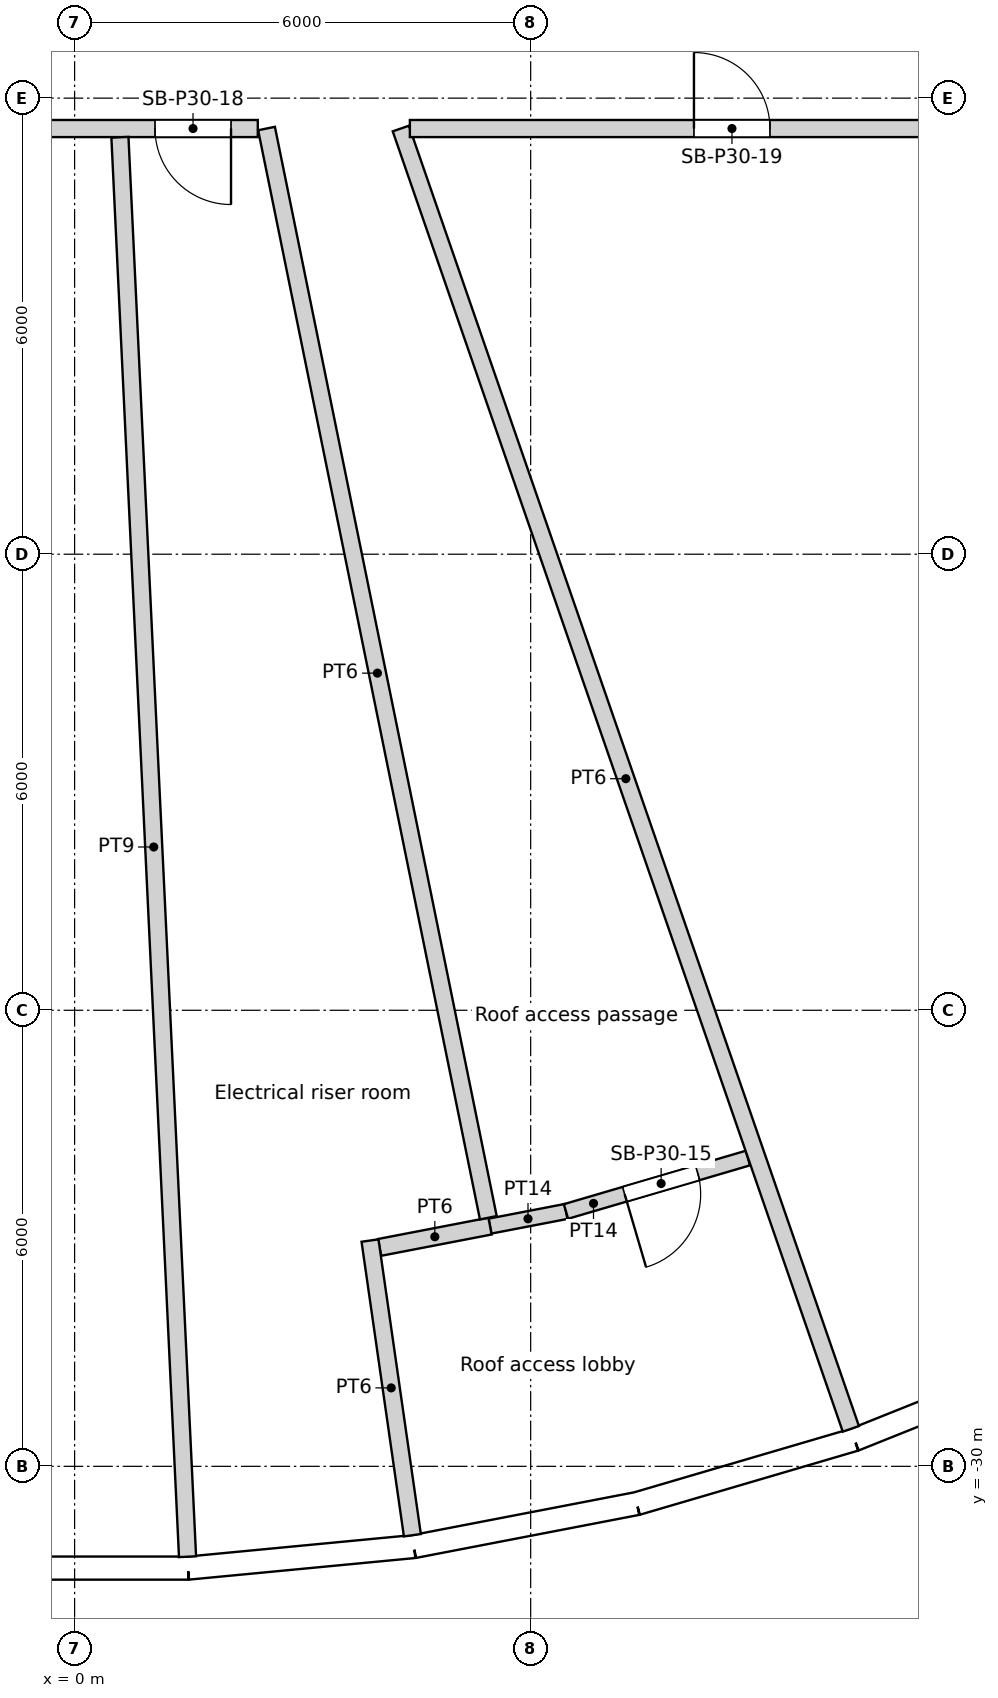
"""IFC4 building model, lengths in metres.
Left out: names, types, materials, properties, quantities, classifications, styles, units other than length and angle.
Written with IfcOpenShell. Run it as: python <this file> out.ifc"""

import sys

from ifc_helpers import new_model, si_unit, direction, frame, frame_2d, origin, origin_2d, place, context, subcontext, project, spatial, rectangle, circle, extrude, element, fill, save


model = new_model("IFC4")
c1 = context("Model", 3, precision=1e-05, world=origin(), true_north=direction((0.0, 1.0)))
c2 = subcontext(c1, "Body", "Model", "MODEL_VIEW")
j1 = project(units=[si_unit("LENGTHUNIT", "METRE"), si_unit("PLANEANGLEUNIT", "RADIAN")], contexts=[c1])
p1 = place(None, origin())
s1 = spatial("IfcSite", under=j1, at=p1, CompositionType="ELEMENT")
p2 = place(p1, origin())
s2 = spatial("IfcBuilding", under=s1, at=p2, CompositionType="ELEMENT")
p3 = place(p2, frame((0.0, 0.0, 120.0)))
s3 = spatial("IfcBuildingStorey", under=s2, at=p3, CompositionType="ELEMENT", Elevation=120.0)
for number, where, z_axis, x_axis in (
    (1, (1.44, -30.24, 0.0), (0.0, 0.0, 1.0), (1.0, 0.0, 0.0)),
    (2, (7.137, -29.421, 0.0), (0.0, 0.0, 1.0), (1.0, 0.0, 0.0)),
):
    element("IfcColumn", number, at=place(p3, frame(where, z_axis=z_axis, x_axis=x_axis)), inside=s3, PredefinedType="COLUMN", context=c2, shape_type="SweptSolid", body=[
        extrude(circle(Radius=0.6, at=origin_2d()), origin(), (0.0, 0.0, 1.0), 6.0),
    ])
for number, where, z_axis, x_axis in (
    (3, (4.263, -24.175, 0.0), (0.0, 0.0, 1.0), (1.0, 0.0, 0.0)),
    (4, (9.723, -22.54, 0.0), (0.0, 0.0, 1.0), (1.0, 0.0, 0.0)),
):
    element("IfcColumn", number, at=place(p3, frame(where, z_axis=z_axis, x_axis=x_axis)), inside=s3, PredefinedType="COLUMN", context=c2, shape_type="SweptSolid", body=[
        extrude(circle(Radius=0.65, at=origin_2d()), origin(), (0.0, 0.0, 1.0), 6.0),
    ])
for number, where, z_axis, x_axis in (
    (5, (1.406, -18.77, 0.0), (0.0, 0.0, 1.0), (1.0, 0.0, 0.0)),
    (6, (6.876, -17.521, 0.0), (0.0, 0.0, 1.0), (1.0, 0.0, 0.0)),
    (7, (11.735, -14.716, 0.0), (0.0, 0.0, 1.0), (1.0, 0.0, 0.0)),
):
    element("IfcColumn", number, at=place(p3, frame(where, z_axis=z_axis, x_axis=x_axis)), inside=s3, PredefinedType="COLUMN", context=c2, shape_type="SweptSolid", body=[
        extrude(circle(Radius=0.7, at=origin_2d()), origin(), (0.0, 0.0, 1.0), 6.0),
    ])
p4 = place(p3, frame((-1.493, -31.339, 0.0), z_axis=(0.0, 0.0, 1.0), x_axis=(1.0, 0.0, 0.0)))
e8 = element("IfcWall", 8, at=p4, inside=s3, PredefinedType="SOLIDWALL", context=c2, shape_type="SweptSolid", body=[
    extrude(rectangle(XDim=2.986, YDim=0.3, at=frame_2d((1.493, 0.0))), origin(), (0.0, 0.0, 1.0), 5.7),
])
p5 = place(p4, frame((1.493, 0.0, 1.8)))
e9 = element("IfcOpeningElement", 9, at=p5, cuts=e8, PredefinedType="OPENING", context=c2, shape_type="SweptSolid", body=[
    extrude(circle(Radius=1.2, at=origin_2d()), frame((0.0, 0.16, 0.0), z_axis=(0.0, -1.0, 0.0), x_axis=(1.0, 0.0, 0.0)), (0.0, 0.0, 1.0), 0.32),
])
p6 = place(p3, frame((1.493, -31.339, 0.0), z_axis=(0.0, 0.0, 1.0), x_axis=(0.99547560533, 0.095017467833, 0.0)))
e10 = element("IfcWall", 10, at=p6, inside=s3, PredefinedType="SOLIDWALL", context=c2, shape_type="SweptSolid", body=[
    extrude(rectangle(XDim=2.986, YDim=0.3, at=frame_2d((1.493, 0.0))), origin(), (0.0, 0.0, 1.0), 5.7),
])
p7 = place(p6, frame((1.493, 0.0, 1.8)))
e11 = element("IfcOpeningElement", 11, at=p7, cuts=e10, PredefinedType="OPENING", context=c2, shape_type="SweptSolid", body=[
    extrude(circle(Radius=1.2, at=origin_2d()), frame((0.0, 0.16, 0.0), z_axis=(0.0, -1.0, 0.0), x_axis=(1.0, 0.0, 0.0)), (0.0, 0.0, 1.0), 0.32),
])
p8 = place(p3, frame((4.465, -31.055, 0.0), z_axis=(0.0, 0.0, 1.0), x_axis=(0.981918853666, 0.189302310646, 0.0)))
e12 = element("IfcWall", 12, at=p8, inside=s3, PredefinedType="SOLIDWALL", context=c2, shape_type="SweptSolid", body=[
    extrude(rectangle(XDim=2.986, YDim=0.3, at=frame_2d((1.493, 0.0))), origin(), (0.0, 0.0, 1.0), 5.7),
])
p9 = place(p8, frame((1.493, 0.0, 1.8)))
e13 = element("IfcOpeningElement", 13, at=p9, cuts=e12, PredefinedType="OPENING", context=c2, shape_type="SweptSolid", body=[
    extrude(circle(Radius=1.2, at=origin_2d()), frame((0.0, 0.16, 0.0), z_axis=(0.0, -1.0, 0.0), x_axis=(1.0, 0.0, 0.0)), (0.0, 0.0, 1.0), 0.32),
])
p10 = place(p3, frame((7.397, -30.49, 0.0), z_axis=(0.0, 0.0, 1.0), x_axis=(0.959502108153, 0.281701445593, 0.0)))
e14 = element("IfcWall", 14, at=p10, inside=s3, PredefinedType="SOLIDWALL", context=c2, shape_type="SweptSolid", body=[
    extrude(rectangle(XDim=2.986, YDim=0.3, at=frame_2d((1.493, 0.0))), origin(), (0.0, 0.0, 1.0), 5.7),
])
p11 = place(p10, frame((1.493, 0.0, 1.8)))
e15 = element("IfcOpeningElement", 15, at=p11, cuts=e14, PredefinedType="OPENING", context=c2, shape_type="SweptSolid", body=[
    extrude(circle(Radius=1.2, at=origin_2d()), frame((0.0, 0.16, 0.0), z_axis=(0.0, -1.0, 0.0), x_axis=(1.0, 0.0, 0.0)), (0.0, 0.0, 1.0), 0.32),
])
p12 = place(p3, frame((10.261, -29.649, 0.0), z_axis=(0.0, 0.0, 1.0), x_axis=(0.928380795373, 0.371630325434, 0.0)))
e16 = element("IfcWall", 16, at=p12, inside=s3, PredefinedType="SOLIDWALL", context=c2, shape_type="SweptSolid", body=[
    extrude(rectangle(XDim=2.986, YDim=0.3, at=frame_2d((1.493, 0.0))), origin(), (0.0, 0.0, 1.0), 5.7),
])
p13 = place(p12, frame((1.493, 0.0, 1.8)))
e17 = element("IfcOpeningElement", 17, at=p13, cuts=e16, PredefinedType="OPENING", context=c2, shape_type="SweptSolid", body=[
    extrude(circle(Radius=1.2, at=origin_2d()), frame((0.0, 0.16, 0.0), z_axis=(0.0, -1.0, 0.0), x_axis=(1.0, 0.0, 0.0)), (0.0, 0.0, 1.0), 0.32),
])
p14 = place(p3, frame((-11.71, -12.4, 0.0), z_axis=(0.0, 0.0, 1.0), x_axis=(1.0, 0.0, 0.0)))
e18 = element("IfcWall", 18, at=p14, inside=s3, PredefinedType="PARTITIONING", context=c2, shape_type="SweptSolid", body=[
    extrude(rectangle(XDim=14.12, YDim=0.225, at=frame_2d((7.06, 0.0))), origin(), (0.0, 0.0, 1.0), 5.2),
])
p15 = place(p14, frame((3.265, 0.0, 0.0)))
e19 = element("IfcOpeningElement", 19, at=p15, cuts=e18, PredefinedType="OPENING", context=c2, shape_type="SweptSolid", body=[
    extrude(rectangle(XDim=1.0, YDim=2.1, at=frame_2d((0.5, 1.05))), frame((0.0, 0.113, 0.0), z_axis=(0.0, -1.0, 0.0), x_axis=(1.0, 0.0, 0.0)), (0.0, 0.0, 1.0), 0.225),
])
p16 = place(p14, frame((9.36, 0.0, 0.0)))
e20 = element("IfcOpeningElement", 20, at=p16, cuts=e18, PredefinedType="OPENING", context=c2, shape_type="SweptSolid", body=[
    extrude(rectangle(XDim=1.0, YDim=2.1, at=frame_2d((0.5, 1.05))), frame((0.0, 0.113, 0.0), z_axis=(0.0, -1.0, 0.0), x_axis=(1.0, 0.0, 0.0)), (0.0, 0.0, 1.0), 0.225),
])
p17 = place(p14, frame((12.768, 0.0, 0.0)))
e21 = element("IfcOpeningElement", 21, at=p17, cuts=e18, PredefinedType="OPENING", context=c2, shape_type="SweptSolid", body=[
    extrude(rectangle(XDim=1.0, YDim=2.1, at=frame_2d((0.5, 1.05))), frame((0.0, 0.113, 0.0), z_axis=(0.0, -1.0, 0.0), x_axis=(1.0, 0.0, 0.0)), (0.0, 0.0, 1.0), 0.225),
])
p18 = place(p3, frame((1.486, -31.189, 0.0), z_axis=(0.0, 0.0, 1.0), x_axis=(-0.047574456268, 0.998867694498, 0.0)))
e22 = element("IfcWall", 22, at=p18, inside=s3, PredefinedType="PARTITIONING", context=c2, shape_type="SweptSolid", body=[
    extrude(rectangle(XDim=18.695, YDim=0.225, at=frame_2d((9.348, 0.0))), origin(), (0.0, 0.0, 1.0), 2.7),
])
p19 = place(p3, frame((4.013, -27.12, 0.0), z_axis=(0.0, 0.0, 1.0), x_axis=(0.981915682772, 0.189318757462, 0.0)))
e23 = element("IfcWall", 23, at=p19, inside=s3, PredefinedType="PARTITIONING", context=c2, shape_type="SweptSolid", body=[
    extrude(rectangle(XDim=1.479, YDim=0.225, at=frame_2d((0.74, 0.0))), origin(), (0.0, 0.0, 1.0), 5.2),
])
p20 = place(p3, frame((4.411, -12.4, 0.0), z_axis=(0.0, 0.0, 1.0), x_axis=(1.0, 0.0, 0.0)))
e24 = element("IfcWall", 24, at=p20, inside=s3, PredefinedType="PARTITIONING", context=c2, shape_type="SweptSolid", body=[
    extrude(rectangle(XDim=13.229, YDim=0.225, at=frame_2d((6.614, 0.0))), origin(), (0.0, 0.0, 1.0), 5.2),
])
p21 = place(p20, frame((3.738, 0.0, 0.0)))
e25 = element("IfcOpeningElement", 25, at=p21, cuts=e24, PredefinedType="OPENING", context=c2, shape_type="SweptSolid", body=[
    extrude(rectangle(XDim=1.0, YDim=2.1, at=frame_2d((0.5, 1.05))), frame((0.0, 0.113, 0.0), z_axis=(0.0, -1.0, 0.0), x_axis=(1.0, 0.0, 0.0)), (0.0, 0.0, 1.0), 0.225),
])
p22 = place(p3, frame((4.444, -30.906, 0.0), z_axis=(0.0, 0.0, 1.0), x_axis=(-0.142302666682, 0.989823191815, 0.0)))
e26 = element("IfcWall", 26, at=p22, inside=s3, PredefinedType="PARTITIONING", context=c2, shape_type="SweptSolid", body=[
    extrude(rectangle(XDim=3.917, YDim=0.225, at=frame_2d((1.958, 0.0))), origin(), (0.0, 0.0, 1.0), 5.2),
])
p23 = place(p3, frame((5.443, -26.729, 0.0), z_axis=(0.0, 0.0, 1.0), x_axis=(-0.199537394252, 0.979890212368, 0.0)))
e27 = element("IfcWall", 27, at=p23, inside=s3, PredefinedType="PARTITIONING", context=c2, shape_type="SweptSolid", body=[
    extrude(rectangle(XDim=14.624, YDim=0.225, at=frame_2d((7.312, 0.0))), origin(), (0.0, 0.0, 1.0), 5.2),
])
p24 = place(p3, frame((5.465, -26.84, 0.0), z_axis=(0.0, 0.0, 1.0), x_axis=(0.981931096213, 0.189238796999, 0.0)))
e28 = element("IfcWall", 28, at=p24, inside=s3, PredefinedType="PARTITIONING", context=c2, shape_type="SweptSolid", body=[
    extrude(rectangle(XDim=1.018, YDim=0.2, at=frame_2d((0.509, 0.0))), origin(), (0.0, 0.0, 1.0), 5.2),
])
p25 = place(p3, frame((8.858, -25.944, 0.0), z_axis=(0.0, 0.0, 1.0), x_axis=(-0.959504098974, -0.281694664577, 0.0)))
e29 = element("IfcWall", 29, at=p25, inside=s3, PredefinedType="PARTITIONING", context=c2, shape_type="SweptSolid", body=[
    extrude(rectangle(XDim=2.494, YDim=0.2, at=frame_2d((1.247, 0.0))), origin(), (0.0, 0.0, 1.0), 5.2),
])
p26 = place(p25, frame((0.69, 0.0, 0.0)))
e30 = element("IfcOpeningElement", 30, at=p26, cuts=e29, PredefinedType="OPENING", context=c2, shape_type="SweptSolid", body=[
    extrude(rectangle(XDim=1.0, YDim=2.1, at=frame_2d((0.5, 1.05))), frame((0.0, 0.1, 0.0), z_axis=(0.0, -1.0, 0.0), x_axis=(1.0, 0.0, 0.0)), (0.0, 0.0, 1.0), 0.2),
])
p27 = place(p3, frame((10.212, -29.507, 0.0), z_axis=(0.0, 0.0, 1.0), x_axis=(-0.327058221259, 0.945004190418, 0.0)))
e31 = element("IfcWall", 31, at=p27, inside=s3, PredefinedType="PARTITIONING", context=c2, shape_type="SweptSolid", body=[
    extrude(rectangle(XDim=18.103, YDim=0.225, at=frame_2d((9.051, 0.0))), origin(), (0.0, 0.0, 1.0), 5.2),
])
p28 = place(p5, origin())
e32 = element("IfcWindow", 32, at=p28, inside=s3, PartitioningType="SINGLE_PANEL", PredefinedType="WINDOW", context=c2, shape_type="SweptSolid", body=[
    extrude(circle(Radius=1.2, at=origin_2d()), frame((0.0, 0.12, 0.0), z_axis=(0.0, -1.0, 0.0), x_axis=(1.0, 0.0, 0.0)), (0.0, 0.0, 1.0), 0.1),
])
fill(e9, e32)
p29 = place(p7, origin())
e33 = element("IfcWindow", 33, at=p29, inside=s3, PartitioningType="SINGLE_PANEL", PredefinedType="WINDOW", context=c2, shape_type="SweptSolid", body=[
    extrude(circle(Radius=1.2, at=origin_2d()), frame((0.0, 0.12, 0.0), z_axis=(0.0, -1.0, 0.0), x_axis=(1.0, 0.0, 0.0)), (0.0, 0.0, 1.0), 0.1),
])
fill(e11, e33)
p30 = place(p9, origin())
e34 = element("IfcWindow", 34, at=p30, inside=s3, PartitioningType="SINGLE_PANEL", PredefinedType="WINDOW", context=c2, shape_type="SweptSolid", body=[
    extrude(circle(Radius=1.2, at=origin_2d()), frame((0.0, 0.12, 0.0), z_axis=(0.0, -1.0, 0.0), x_axis=(1.0, 0.0, 0.0)), (0.0, 0.0, 1.0), 0.1),
])
fill(e13, e34)
p31 = place(p11, origin())
e35 = element("IfcWindow", 35, at=p31, inside=s3, PartitioningType="SINGLE_PANEL", PredefinedType="WINDOW", context=c2, shape_type="SweptSolid", body=[
    extrude(circle(Radius=1.2, at=origin_2d()), frame((0.0, 0.12, 0.0), z_axis=(0.0, -1.0, 0.0), x_axis=(1.0, 0.0, 0.0)), (0.0, 0.0, 1.0), 0.1),
])
fill(e15, e35)
p32 = place(p13, origin())
e36 = element("IfcWindow", 36, at=p32, inside=s3, PartitioningType="SINGLE_PANEL", PredefinedType="WINDOW", context=c2, shape_type="SweptSolid", body=[
    extrude(circle(Radius=1.2, at=origin_2d()), frame((0.0, 0.12, 0.0), z_axis=(0.0, -1.0, 0.0), x_axis=(1.0, 0.0, 0.0)), (0.0, 0.0, 1.0), 0.1),
])
fill(e17, e36)
p33 = place(p26, origin())
e37 = element("IfcDoor", 37, at=p33, inside=s3, OperationType="SINGLE_SWING_RIGHT", PredefinedType="DOOR", context=c2, shape_type="SweptSolid", body=[
    extrude(rectangle(XDim=1.0, YDim=2.1, at=frame_2d((0.5, 1.05))), frame((0.0, 0.025, 0.0), z_axis=(0.0, -1.0, 0.0), x_axis=(1.0, 0.0, 0.0)), (0.0, 0.0, 1.0), 0.05),
])
fill(e30, e37)
p34 = place(p17, origin())
e38 = element("IfcDoor", 38, at=p34, inside=s3, OperationType="SINGLE_SWING_LEFT", PredefinedType="DOOR", context=c2, shape_type="SweptSolid", body=[
    extrude(rectangle(XDim=1.0, YDim=2.1, at=frame_2d((0.5, 1.05))), frame((0.0, 0.025, 0.0), z_axis=(0.0, -1.0, 0.0), x_axis=(1.0, 0.0, 0.0)), (0.0, 0.0, 1.0), 0.05),
])
fill(e21, e38)
p35 = place(p21, origin())
e39 = element("IfcDoor", 39, at=p35, inside=s3, OperationType="SINGLE_SWING_LEFT", PredefinedType="DOOR", context=c2, shape_type="SweptSolid", body=[
    extrude(rectangle(XDim=1.0, YDim=2.1, at=frame_2d((0.5, 1.05))), frame((0.0, 0.025, 0.0), z_axis=(0.0, -1.0, 0.0), x_axis=(1.0, 0.0, 0.0)), (0.0, 0.0, 1.0), 0.05),
])
fill(e25, e39)
save(model, sys.argv[1])
